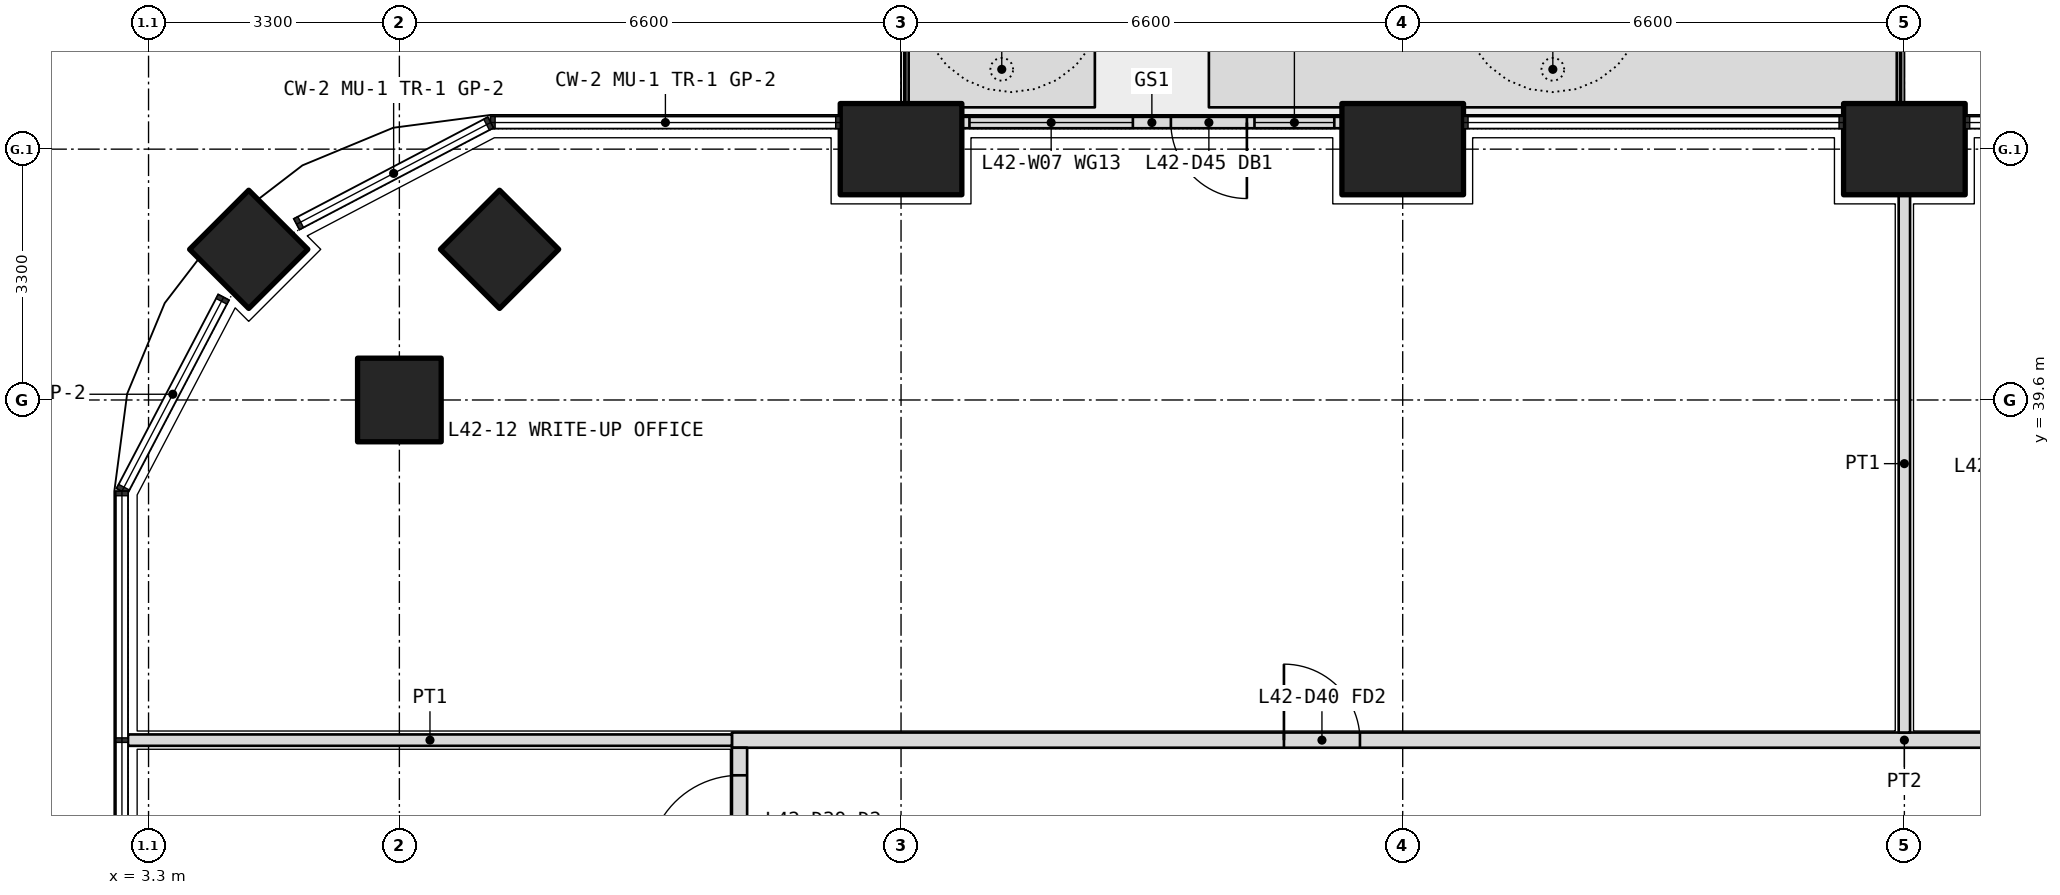
"""IFC4 building model, lengths in metres.
Left out: names, types, materials, properties, quantities, classifications, styles, units other than length and angle.
Written with IfcOpenShell. Run it as: python <this file> out.ifc"""

import sys

from ifc_helpers import new_model, si_unit, direction, frame, frame_2d, origin, origin_2d, place, context, subcontext, project, spatial, polyline, rectangle, outline, extrude, element, fill, save


model = new_model("IFC4")
c1 = context("Model", 3, precision=1e-05, world=origin(), true_north=direction((0.0, 1.0)))
c2 = subcontext(c1, "Body", "Model", "MODEL_VIEW")
j1 = project(units=[si_unit("LENGTHUNIT", "METRE"), si_unit("PLANEANGLEUNIT", "RADIAN")], contexts=[c1])
p1 = place(None, origin())
s1 = spatial("IfcSite", under=j1, at=p1, CompositionType="ELEMENT")
p2 = place(p1, origin())
s2 = spatial("IfcBuilding", under=s1, at=p2, CompositionType="ELEMENT")
p3 = place(p2, frame((0.0, 0.0, 185.1)))
s3 = spatial("IfcBuildingStorey", under=s2, at=p3, CompositionType="ELEMENT", Elevation=185.1)
p4 = place(p3, frame((4.618, 41.582, 0.0), z_axis=(0.0, 0.0, 1.0), x_axis=(0.707106781187, 0.707106781187, 0.0)))
e1 = element("IfcColumn", 1, at=p4, inside=s3, PredefinedType="COLUMN", context=c2, shape_type="SweptSolid", body=[
    extrude(rectangle(XDim=1.1, YDim=1.1, at=origin_2d()), origin(), (0.0, 0.0, 1.0), 4.2),
])
for number, where, z_axis, x_axis in (
    (2, (13.2, 42.9, 0.0), (0.0, 0.0, 1.0), (1.0, 0.0, 0.0)),
    (3, (19.8, 42.9, 0.0), (0.0, 0.0, 1.0), (1.0, 0.0, 0.0)),
    (4, (26.4, 42.9, 0.0), (0.0, 0.0, 1.0), (1.0, 0.0, 0.0)),
):
    element("IfcColumn", number, at=place(p3, frame(where, z_axis=z_axis, x_axis=x_axis)), inside=s3, PredefinedType="COLUMN", context=c2, shape_type="SweptSolid", body=[
        extrude(rectangle(XDim=1.6, YDim=1.2, at=origin_2d()), origin(), (0.0, 0.0, 1.0), 4.2),
    ])
for number, where, z_axis, x_axis in (
    (5, (6.6, 39.6, 0.0), (0.0, 0.0, 1.0), (1.0, 0.0, 0.0)),
    (6, (7.918, 41.582, 0.0), (0.0, 0.0, 1.0), (0.707, 0.707, 0.0)),
):
    element("IfcColumn", number, at=place(p3, frame(where, z_axis=z_axis, x_axis=x_axis)), inside=s3, PredefinedType="COLUMN", context=c2, shape_type="SweptSolid", body=[
        extrude(rectangle(XDim=1.1, YDim=1.1, at=origin_2d()), origin(), (0.0, 0.0, 1.0), 4.2),
    ])
p5 = place(p3, origin())
e7 = element("IfcWall", 7, at=p5, inside=s3, PredefinedType="USERDEFINED", context=c2, shape_type="SweptSolid", body=[
    extrude(outline(polyline([(13.3, 43.45), (15.75, 43.45), (15.75, 44.45), (13.3, 44.45), (13.3, 43.45)]), holes=[polyline([(13.45, 43.6), (15.6, 43.6), (15.6, 44.3), (13.45, 44.3), (13.45, 43.6)])]), origin(), (0.0, 0.0, 1.0), 1.05),
])
p6 = place(p3, origin())
e8 = element("IfcWall", 8, at=p6, inside=s3, PredefinedType="USERDEFINED", context=c2, shape_type="SweptSolid", body=[
    extrude(outline(polyline([(17.25, 43.45), (26.3, 43.45), (26.3, 44.45), (17.25, 44.45), (17.25, 43.45)]), holes=[polyline([(17.4, 43.6), (26.15, 43.6), (26.15, 44.3), (17.4, 44.3), (17.4, 43.6)])]), origin(), (0.0, 0.0, 1.0), 1.05),
])
p7 = place(p3, frame((19.0, 43.25, 0.0), z_axis=(0.0, 0.0, 1.0), x_axis=(-1.0, 0.0, 0.0)))
e9 = element("IfcWall", 9, at=p7, inside=s3, PredefinedType="SOLIDWALL", context=c2, shape_type="SweptSolid", body=[
    extrude(rectangle(XDim=5.0, YDim=0.15, at=frame_2d((2.5, 0.0))), origin(), (0.0, 0.0, 1.0), 2.7),
])
p8 = place(p7, frame((1.25, 0.0, 0.0)))
e10 = element("IfcOpeningElement", 10, at=p8, cuts=e9, PredefinedType="OPENING", context=c2, shape_type="SweptSolid", body=[
    extrude(rectangle(XDim=1.0, YDim=2.4, at=frame_2d((0.5, 1.2))), frame((0.0, 0.085, 0.0), z_axis=(0.0, -1.0, 0.0), x_axis=(1.0, 0.0, 0.0)), (0.0, 0.0, 1.0), 0.17),
])
p9 = place(p7, frame((0.1, 0.0, 0.1)))
e11 = element("IfcOpeningElement", 11, at=p9, cuts=e9, PredefinedType="OPENING", context=c2, shape_type="SweptSolid", body=[
    extrude(rectangle(XDim=1.05, YDim=2.3, at=frame_2d((0.525, 1.15))), frame((0.0, 0.085, 0.0), z_axis=(0.0, -1.0, 0.0), x_axis=(1.0, 0.0, 0.0)), (0.0, 0.0, 1.0), 0.17),
])
p10 = place(p7, frame((2.75, 0.0, 0.1)))
e12 = element("IfcOpeningElement", 12, at=p10, cuts=e9, PredefinedType="OPENING", context=c2, shape_type="SweptSolid", body=[
    extrude(rectangle(XDim=2.15, YDim=2.3, at=frame_2d((1.075, 1.15))), frame((0.0, 0.085, 0.0), z_axis=(0.0, -1.0, 0.0), x_axis=(1.0, 0.0, 0.0)), (0.0, 0.0, 1.0), 0.17),
])
p11 = place(p3, frame((10.975, 35.125, 0.0), z_axis=(0.0, 0.0, 1.0), x_axis=(1.0, 0.0, 0.0)))
e13 = element("IfcWall", 13, at=p11, inside=s3, PredefinedType="PARTITIONING", context=c2, shape_type="SweptSolid", body=[
    extrude(rectangle(XDim=30.85, YDim=0.2, at=frame_2d((15.425, 0.0))), origin(), (0.0, 0.0, 1.0), 2.85),
])
p12 = place(p11, frame((7.262, 0.0, 0.0)))
e14 = element("IfcOpeningElement", 14, at=p12, cuts=e13, PredefinedType="OPENING", context=c2, shape_type="SweptSolid", body=[
    extrude(rectangle(XDim=1.0, YDim=2.1, at=frame_2d((0.5, 1.05))), frame((0.0, 0.11, 0.0), z_axis=(0.0, -1.0, 0.0), x_axis=(1.0, 0.0, 0.0)), (0.0, 0.0, 1.0), 0.22),
])
p13 = place(p11, frame((17.025, 0.0, 0.0)))
e15 = element("IfcOpeningElement", 15, at=p13, cuts=e13, PredefinedType="OPENING", context=c2, shape_type="SweptSolid", body=[
    extrude(rectangle(XDim=1.0, YDim=2.1, at=frame_2d((0.5, 1.05))), frame((0.0, 0.11, 0.0), z_axis=(0.0, -1.0, 0.0), x_axis=(1.0, 0.0, 0.0)), (0.0, 0.0, 1.0), 0.22),
])
p14 = place(p11, frame((20.325, 0.0, 0.0)))
e16 = element("IfcOpeningElement", 16, at=p14, cuts=e13, PredefinedType="OPENING", context=c2, shape_type="SweptSolid", body=[
    extrude(rectangle(XDim=1.0, YDim=2.1, at=frame_2d((0.5, 1.05))), frame((0.0, 0.11, 0.0), z_axis=(0.0, -1.0, 0.0), x_axis=(1.0, 0.0, 0.0)), (0.0, 0.0, 1.0), 0.22),
])
p15 = place(p11, frame((24.725, 0.0, 0.0)))
e17 = element("IfcOpeningElement", 17, at=p15, cuts=e13, PredefinedType="OPENING", context=c2, shape_type="SweptSolid", body=[
    extrude(rectangle(XDim=1.2, YDim=2.1, at=frame_2d((0.6, 1.05))), frame((0.0, 0.11, 0.0), z_axis=(0.0, -1.0, 0.0), x_axis=(1.0, 0.0, 0.0)), (0.0, 0.0, 1.0), 0.22),
])
p16 = place(p11, frame((29.188, 0.0, 0.0)))
e18 = element("IfcOpeningElement", 18, at=p16, cuts=e13, PredefinedType="OPENING", context=c2, shape_type="SweptSolid", body=[
    extrude(rectangle(XDim=1.0, YDim=2.1, at=frame_2d((0.5, 1.05))), frame((0.0, 0.11, 0.0), z_axis=(0.0, -1.0, 0.0), x_axis=(1.0, 0.0, 0.0)), (0.0, 0.0, 1.0), 0.22),
])
p17 = place(p3, frame((11.075, 29.7, 0.0), z_axis=(0.0, 0.0, 1.0), x_axis=(0.0, 1.0, 0.0)))
e19 = element("IfcWall", 19, at=p17, inside=s3, PredefinedType="PARTITIONING", context=c2, shape_type="SweptSolid", body=[
    extrude(rectangle(XDim=5.325, YDim=0.2, at=frame_2d((2.663, 0.0))), origin(), (0.0, 0.0, 1.0), 2.85),
])
p18 = place(p17, frame((1.15, 0.0, 0.0)))
e20 = element("IfcOpeningElement", 20, at=p18, cuts=e19, PredefinedType="OPENING", context=c2, shape_type="SweptSolid", body=[
    extrude(rectangle(XDim=1.0, YDim=2.1, at=frame_2d((0.5, 1.05))), frame((0.0, 0.11, 0.0), z_axis=(0.0, -1.0, 0.0), x_axis=(1.0, 0.0, 0.0)), (0.0, 0.0, 1.0), 0.22),
])
p19 = place(p17, frame((3.762, 0.0, 0.0)))
e21 = element("IfcOpeningElement", 21, at=p19, cuts=e19, PredefinedType="OPENING", context=c2, shape_type="SweptSolid", body=[
    extrude(rectangle(XDim=1.2, YDim=2.1, at=frame_2d((0.6, 1.05))), frame((0.0, 0.11, 0.0), z_axis=(0.0, -1.0, 0.0), x_axis=(1.0, 0.0, 0.0)), (0.0, 0.0, 1.0), 0.22),
])
p20 = place(p3, frame((3.03, 35.125, 0.0), z_axis=(0.0, 0.0, 1.0), x_axis=(1.0, 0.0, 0.0)))
e22 = element("IfcWall", 22, at=p20, inside=s3, PredefinedType="PARTITIONING", context=c2, shape_type="SweptSolid", body=[
    extrude(rectangle(XDim=7.945, YDim=0.15, at=frame_2d((3.973, 0.0))), origin(), (0.0, 0.0, 1.0), 2.7),
])
p21 = place(p3, frame((26.4, 42.3, 0.0), z_axis=(0.0, 0.0, 1.0), x_axis=(0.0, -1.0, 0.0)))
e23 = element("IfcWall", 23, at=p21, inside=s3, PredefinedType="PARTITIONING", context=c2, shape_type="SweptSolid", body=[
    extrude(rectangle(XDim=7.075, YDim=0.15, at=frame_2d((3.538, 0.0))), origin(), (0.0, 0.0, 1.0), 2.85),
])
p22 = place(p8, origin())
e24 = element("IfcDoor", 24, at=p22, inside=s3, OperationType="SINGLE_SWING_LEFT", PredefinedType="DOOR", context=c2, shape_type="SweptSolid", body=[
    extrude(rectangle(XDim=1.0, YDim=2.4, at=frame_2d((0.5, 1.2))), frame((0.0, 0.025, 0.0), z_axis=(0.0, -1.0, 0.0), x_axis=(1.0, 0.0, 0.0)), (0.0, 0.0, 1.0), 0.05),
])
fill(e10, e24)
p23 = place(p9, origin())
e25 = element("IfcWindow", 25, at=p23, inside=s3, PartitioningType="SINGLE_PANEL", PredefinedType="WINDOW", context=c2, shape_type="SweptSolid", body=[
    extrude(rectangle(XDim=1.05, YDim=2.3, at=frame_2d((0.525, 1.15))), frame((0.0, 0.03, 0.0), z_axis=(0.0, -1.0, 0.0), x_axis=(1.0, 0.0, 0.0)), (0.0, 0.0, 1.0), 0.06),
])
fill(e11, e25)
p24 = place(p10, origin())
e26 = element("IfcWindow", 26, at=p24, inside=s3, PartitioningType="SINGLE_PANEL", PredefinedType="WINDOW", context=c2, shape_type="SweptSolid", body=[
    extrude(rectangle(XDim=2.15, YDim=2.3, at=frame_2d((1.075, 1.15))), frame((0.0, 0.03, 0.0), z_axis=(0.0, -1.0, 0.0), x_axis=(1.0, 0.0, 0.0)), (0.0, 0.0, 1.0), 0.06),
])
fill(e12, e26)
p25 = place(p12, origin())
e27 = element("IfcDoor", 27, at=p25, inside=s3, OperationType="SINGLE_SWING_LEFT", PredefinedType="DOOR", context=c2, shape_type="SweptSolid", body=[
    extrude(rectangle(XDim=1.0, YDim=2.1, at=frame_2d((0.5, 1.05))), frame((0.0, 0.025, 0.0), z_axis=(0.0, -1.0, 0.0), x_axis=(1.0, 0.0, 0.0)), (0.0, 0.0, 1.0), 0.05),
])
fill(e14, e27)
p26 = place(p19, origin())
e28 = element("IfcDoor", 28, at=p26, inside=s3, OperationType="DOUBLE_DOOR_SINGLE_SWING", PredefinedType="DOOR", context=c2, shape_type="SweptSolid", body=[
    extrude(rectangle(XDim=1.2, YDim=2.1, at=frame_2d((0.6, 1.05))), frame((0.0, 0.025, 0.0), z_axis=(0.0, -1.0, 0.0), x_axis=(1.0, 0.0, 0.0)), (0.0, 0.0, 1.0), 0.05),
])
fill(e21, e28)
save(model, sys.argv[1])
